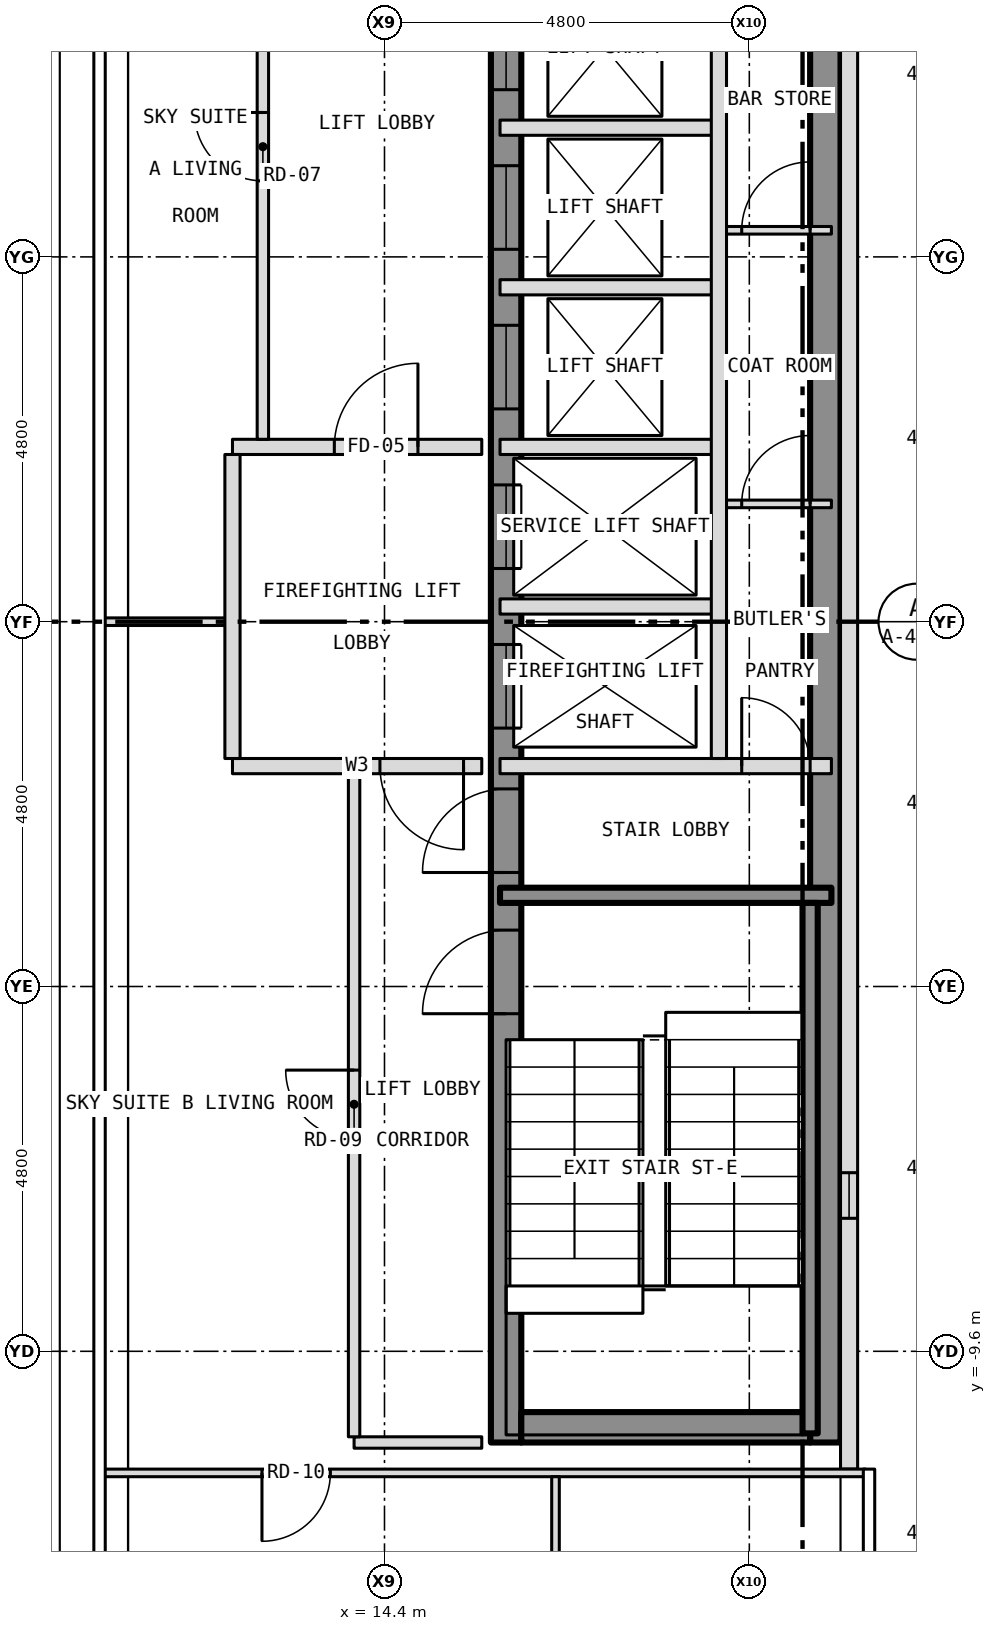
"""IFC4 building model, lengths in metres.
Left out: names, types, materials, properties, quantities, classifications, styles, units other than length and angle.
Written with IfcOpenShell. Run it as: python <this file> out.ifc"""

import sys

from ifc_helpers import new_model, si_unit, direction, frame, frame_2d, origin, place, context, subcontext, project, spatial, rectangle, extrude, element, fill, save


model = new_model("IFC4")
c1 = context("Model", 3, precision=1e-05, world=origin(), true_north=direction((0.0, 1.0)))
c2 = subcontext(c1, "Body", "Model", "MODEL_VIEW")
j1 = project(units=[si_unit("LENGTHUNIT", "METRE"), si_unit("PLANEANGLEUNIT", "RADIAN")], contexts=[c1])
p1 = place(None, origin())
s1 = spatial("IfcSite", under=j1, at=p1, CompositionType="ELEMENT")
p2 = place(p1, origin())
s2 = spatial("IfcBuilding", under=s1, at=p2, CompositionType="ELEMENT")
p3 = place(p2, frame((0.0, 0.0, 283.0)))
s3 = spatial("IfcBuildingStorey", under=s2, at=p3, CompositionType="ELEMENT", Elevation=283.0)
p4 = place(p3, frame((16.0, -10.8, 0.0), z_axis=(0.0, 0.0, 1.0), x_axis=(0.0, 1.0, 0.0)))
e1 = element("IfcWall", 1, at=p4, inside=s3, PredefinedType="SHEAR", context=c2, shape_type="SweptSolid", body=[
    extrude(rectangle(XDim=21.6, YDim=0.4, at=frame_2d((10.8, 0.0))), origin(), (0.0, 0.0, 1.0), 3.25),
])
p5 = place(p4, frame((9.4, 0.0, 0.0)))
e2 = element("IfcOpeningElement", 2, at=p5, cuts=e1, PredefinedType="OPENING", context=c2, shape_type="SweptSolid", body=[
    extrude(rectangle(XDim=1.1, YDim=2.1, at=frame_2d((0.55, 1.05))), frame((0.0, 0.212, 0.0), z_axis=(0.0, -1.0, 0.0), x_axis=(1.0, 0.0, 0.0)), (0.0, 0.0, 1.0), 0.424),
])
p6 = place(p4, frame((11.5, 0.0, 0.0)))
e3 = element("IfcOpeningElement", 3, at=p6, cuts=e1, PredefinedType="OPENING", context=c2, shape_type="SweptSolid", body=[
    extrude(rectangle(XDim=1.1, YDim=2.1, at=frame_2d((0.55, 1.05))), frame((0.0, 0.212, 0.0), z_axis=(0.0, -1.0, 0.0), x_axis=(1.0, 0.0, 0.0)), (0.0, 0.0, 1.0), 0.424),
])
p7 = place(p4, frame((13.6, 0.0, 0.0)))
e4 = element("IfcOpeningElement", 4, at=p7, cuts=e1, PredefinedType="OPENING", context=c2, shape_type="SweptSolid", body=[
    extrude(rectangle(XDim=1.1, YDim=2.1, at=frame_2d((0.55, 1.05))), frame((0.0, 0.212, 0.0), z_axis=(0.0, -1.0, 0.0), x_axis=(1.0, 0.0, 0.0)), (0.0, 0.0, 1.0), 0.424),
])
p8 = place(p4, frame((15.7, 0.0, 0.0)))
e5 = element("IfcOpeningElement", 5, at=p8, cuts=e1, PredefinedType="OPENING", context=c2, shape_type="SweptSolid", body=[
    extrude(rectangle(XDim=1.1, YDim=2.1, at=frame_2d((0.55, 1.05))), frame((0.0, 0.212, 0.0), z_axis=(0.0, -1.0, 0.0), x_axis=(1.0, 0.0, 0.0)), (0.0, 0.0, 1.0), 0.424),
])
p9 = place(p4, frame((17.8, 0.0, 0.0)))
e6 = element("IfcOpeningElement", 6, at=p9, cuts=e1, PredefinedType="OPENING", context=c2, shape_type="SweptSolid", body=[
    extrude(rectangle(XDim=1.1, YDim=2.1, at=frame_2d((0.55, 1.05))), frame((0.0, 0.212, 0.0), z_axis=(0.0, -1.0, 0.0), x_axis=(1.0, 0.0, 0.0)), (0.0, 0.0, 1.0), 0.424),
])
p10 = place(p4, frame((5.642, 0.0, 0.0)))
e7 = element("IfcOpeningElement", 7, at=p10, cuts=e1, PredefinedType="OPENING", context=c2, shape_type="SweptSolid", body=[
    extrude(rectangle(XDim=1.1, YDim=2.1, at=frame_2d((0.55, 1.05))), frame((0.0, 0.212, 0.0), z_axis=(0.0, -1.0, 0.0), x_axis=(1.0, 0.0, 0.0)), (0.0, 0.0, 1.0), 0.424),
])
p11 = place(p4, frame((7.5, 0.0, 0.0)))
e8 = element("IfcOpeningElement", 8, at=p11, cuts=e1, PredefinedType="OPENING", context=c2, shape_type="SweptSolid", body=[
    extrude(rectangle(XDim=1.1, YDim=2.1, at=frame_2d((0.55, 1.05))), frame((0.0, 0.212, 0.0), z_axis=(0.0, -1.0, 0.0), x_axis=(1.0, 0.0, 0.0)), (0.0, 0.0, 1.0), 0.424),
])
p12 = place(p4, frame((20.0, 0.0, 0.0)))
e9 = element("IfcOpeningElement", 9, at=p12, cuts=e1, PredefinedType="OPENING", context=c2, shape_type="SweptSolid", body=[
    extrude(rectangle(XDim=0.9, YDim=2.1, at=frame_2d((0.45, 1.05))), frame((0.0, 0.212, 0.0), z_axis=(0.0, -1.0, 0.0), x_axis=(1.0, 0.0, 0.0)), (0.0, 0.0, 1.0), 0.424),
])
p13 = place(p3, frame((20.2, -10.8, 0.0), z_axis=(0.0, 0.0, 1.0), x_axis=(0.0, 1.0, 0.0)))
e10 = element("IfcWall", 10, at=p13, inside=s3, PredefinedType="SHEAR", context=c2, shape_type="SweptSolid", body=[
    extrude(rectangle(XDim=21.6, YDim=0.4, at=frame_2d((10.8, 0.0))), origin(), (0.0, 0.0, 1.0), 3.25),
])
p14 = place(p3, frame((16.2, -10.6, 0.0), z_axis=(0.0, 0.0, 1.0), x_axis=(1.0, 0.0, 0.0)))
e11 = element("IfcWall", 11, at=p14, inside=s3, PredefinedType="SHEAR", context=c2, shape_type="SweptSolid", body=[
    extrude(rectangle(XDim=3.8, YDim=0.4, at=frame_2d((1.9, 0.0))), origin(), (0.0, 0.0, 1.0), 3.25),
])
p15 = place(p3, frame((20.512, -11.15, 0.0), z_axis=(0.0, 0.0, 1.0), x_axis=(0.0, 1.0, 0.0)))
e12 = element("IfcWall", 12, at=p15, inside=s3, PredefinedType="SOLIDWALL", context=c2, shape_type="SweptSolid", body=[
    extrude(rectangle(XDim=22.3, YDim=0.225, at=frame_2d((11.15, 0.0))), origin(), (0.0, 0.0, 1.0), 3.5),
])
p16 = place(p15, frame((3.3, 0.0, 1.0)))
e13 = element("IfcOpeningElement", 13, at=p16, cuts=e12, PredefinedType="OPENING", context=c2, shape_type="SweptSolid", body=[
    extrude(rectangle(XDim=0.6, YDim=1.5, at=frame_2d((0.3, 0.75))), frame((0.0, 0.125, 0.0), z_axis=(0.0, -1.0, 0.0), x_axis=(1.0, 0.0, 0.0)), (0.0, 0.0, 1.0), 0.249),
])
p17 = place(p3, frame((10.696, -11.2, 0.0), z_axis=(0.0, 0.0, 1.0), x_axis=(1.0, 0.0, 0.0)))
e14 = element("IfcWall", 14, at=p17, inside=s3, PredefinedType="PARTITIONING", context=c2, shape_type="SweptSolid", body=[
    extrude(rectangle(XDim=10.034, YDim=0.1, at=frame_2d((5.017, 0.0))), origin(), (0.0, 0.0, 1.0), 3.35),
])
p18 = place(p17, frame((2.092, 0.0, 0.0)))
e15 = element("IfcOpeningElement", 15, at=p18, cuts=e14, PredefinedType="OPENING", context=c2, shape_type="SweptSolid", body=[
    extrude(rectangle(XDim=0.9, YDim=2.1, at=frame_2d((0.45, 1.05))), frame((0.0, 0.062, 0.0), z_axis=(0.0, -1.0, 0.0), x_axis=(1.0, 0.0, 0.0)), (0.0, 0.0, 1.0), 0.124),
])
p19 = place(p3, frame((14.0, -10.8, 0.0), z_axis=(0.0, 0.0, 1.0), x_axis=(1.0, 0.0, 0.0)))
e16 = element("IfcWall", 16, at=p19, inside=s3, PredefinedType="PARTITIONING", context=c2, shape_type="SweptSolid", body=[
    extrude(rectangle(XDim=1.68, YDim=0.15, at=frame_2d((0.84, 0.0))), origin(), (0.0, 0.0, 1.0), 3.35),
])
p20 = place(p3, frame((15.92, -3.6, 0.0), z_axis=(0.0, 0.0, 1.0), x_axis=(1.0, 0.0, 0.0)))
e17 = element("IfcWall", 17, at=p20, inside=s3, PredefinedType="SHEAR", context=c2, shape_type="SweptSolid", body=[
    extrude(rectangle(XDim=4.36, YDim=0.2, at=frame_2d((2.18, 0.0))), origin(), (0.0, 0.0, 1.0), 3.25),
])
p21 = place(p3, frame((12.4, -1.9, 0.0), z_axis=(0.0, 0.0, 1.0), x_axis=(1.0, 0.0, 0.0)))
e18 = element("IfcWall", 18, at=p21, inside=s3, PredefinedType="PARTITIONING", context=c2, shape_type="SweptSolid", body=[
    extrude(rectangle(XDim=3.28, YDim=0.2, at=frame_2d((1.64, 0.0))), origin(), (0.0, 0.0, 1.0), 3.35),
])
p22 = place(p21, frame((1.94, 0.0, 0.0)))
e19 = element("IfcOpeningElement", 19, at=p22, cuts=e18, PredefinedType="OPENING", context=c2, shape_type="SweptSolid", body=[
    extrude(rectangle(XDim=1.1, YDim=2.1, at=frame_2d((0.55, 1.05))), frame((0.0, 0.112, 0.0), z_axis=(0.0, -1.0, 0.0), x_axis=(1.0, 0.0, 0.0)), (0.0, 0.0, 1.0), 0.224),
])
p23 = place(p3, frame((15.92, -1.9, 0.0), z_axis=(0.0, 0.0, 1.0), x_axis=(1.0, 0.0, 0.0)))
e20 = element("IfcWall", 20, at=p23, inside=s3, PredefinedType="PARTITIONING", context=c2, shape_type="SweptSolid", body=[
    extrude(rectangle(XDim=4.36, YDim=0.2, at=frame_2d((2.18, 0.0))), origin(), (0.0, 0.0, 1.0), 3.25),
])
p24 = place(p23, frame((3.18, 0.0, 0.0)))
e21 = element("IfcOpeningElement", 21, at=p24, cuts=e20, PredefinedType="OPENING", context=c2, shape_type="SweptSolid", body=[
    extrude(rectangle(XDim=0.9, YDim=2.1, at=frame_2d((0.45, 1.05))), frame((0.0, 0.112, 0.0), z_axis=(0.0, -1.0, 0.0), x_axis=(1.0, 0.0, 0.0)), (0.0, 0.0, 1.0), 0.224),
])
p25 = place(p3, frame((10.696, 0.0, 0.0), z_axis=(0.0, 0.0, 1.0), x_axis=(1.0, 0.0, 0.0)))
e22 = element("IfcWall", 22, at=p25, inside=s3, PredefinedType="PARTITIONING", context=c2, shape_type="SweptSolid", body=[
    extrude(rectangle(XDim=1.704, YDim=0.1, at=frame_2d((0.852, 0.0))), origin(), (0.0, 0.0, 1.0), 2.728),
])
p26 = place(p3, frame((15.92, 0.2, 0.0), z_axis=(0.0, 0.0, 1.0), x_axis=(1.0, 0.0, 0.0)))
e23 = element("IfcWall", 23, at=p26, inside=s3, PredefinedType="PARTITIONING", context=c2, shape_type="SweptSolid", body=[
    extrude(rectangle(XDim=2.88, YDim=0.2, at=frame_2d((1.44, 0.0))), origin(), (0.0, 0.0, 1.0), 3.25),
])
p27 = place(p3, frame((18.8, 1.55, 0.0), z_axis=(0.0, 0.0, 1.0), x_axis=(1.0, 0.0, 0.0)))
e24 = element("IfcWall", 24, at=p27, inside=s3, PredefinedType="PARTITIONING", context=c2, shape_type="SweptSolid", body=[
    extrude(rectangle(XDim=1.48, YDim=0.1, at=frame_2d((0.74, 0.0))), origin(), (0.0, 0.0, 1.0), 3.25),
])
p28 = place(p27, frame((0.3, 0.0, 0.0)))
e25 = element("IfcOpeningElement", 25, at=p28, cuts=e24, PredefinedType="OPENING", context=c2, shape_type="SweptSolid", body=[
    extrude(rectangle(XDim=0.9, YDim=2.1, at=frame_2d((0.45, 1.05))), frame((0.0, 0.062, 0.0), z_axis=(0.0, -1.0, 0.0), x_axis=(1.0, 0.0, 0.0)), (0.0, 0.0, 1.0), 0.124),
])
p29 = place(p3, frame((12.4, 2.3, 0.0), z_axis=(0.0, 0.0, 1.0), x_axis=(1.0, 0.0, 0.0)))
e26 = element("IfcWall", 26, at=p29, inside=s3, PredefinedType="PARTITIONING", context=c2, shape_type="SweptSolid", body=[
    extrude(rectangle(XDim=3.28, YDim=0.2, at=frame_2d((1.64, 0.0))), origin(), (0.0, 0.0, 1.0), 3.35),
])
p30 = place(p29, frame((1.34, 0.0, 0.0)))
e27 = element("IfcOpeningElement", 27, at=p30, cuts=e26, PredefinedType="OPENING", context=c2, shape_type="SweptSolid", body=[
    extrude(rectangle(XDim=1.1, YDim=2.1, at=frame_2d((0.55, 1.05))), frame((0.0, 0.112, 0.0), z_axis=(0.0, -1.0, 0.0), x_axis=(1.0, 0.0, 0.0)), (0.0, 0.0, 1.0), 0.224),
])
for number, where, z_axis, x_axis in (
    (28, (15.92, 2.3, 0.0), (0.0, 0.0, 1.0), (1.0, 0.0, 0.0)),
    (29, (15.92, 4.4, 0.0), (0.0, 0.0, 1.0), (1.0, 0.0, 0.0)),
):
    element("IfcWall", number, at=place(p3, frame(where, z_axis=z_axis, x_axis=x_axis)), inside=s3, PredefinedType="PARTITIONING", context=c2, shape_type="SweptSolid", body=[
        extrude(rectangle(XDim=2.88, YDim=0.2, at=frame_2d((1.44, 0.0))), origin(), (0.0, 0.0, 1.0), 3.25),
    ])
p31 = place(p3, frame((18.8, 5.15, 0.0), z_axis=(0.0, 0.0, 1.0), x_axis=(1.0, 0.0, 0.0)))
e30 = element("IfcWall", 30, at=p31, inside=s3, PredefinedType="PARTITIONING", context=c2, shape_type="SweptSolid", body=[
    extrude(rectangle(XDim=1.48, YDim=0.1, at=frame_2d((0.74, 0.0))), origin(), (0.0, 0.0, 1.0), 3.25),
])
p32 = place(p31, frame((0.3, 0.0, 0.0)))
e31 = element("IfcOpeningElement", 31, at=p32, cuts=e30, PredefinedType="OPENING", context=c2, shape_type="SweptSolid", body=[
    extrude(rectangle(XDim=0.9, YDim=2.1, at=frame_2d((0.45, 1.05))), frame((0.0, 0.062, 0.0), z_axis=(0.0, -1.0, 0.0), x_axis=(1.0, 0.0, 0.0)), (0.0, 0.0, 1.0), 0.124),
])
p33 = place(p3, frame((15.92, 6.5, 0.0), z_axis=(0.0, 0.0, 1.0), x_axis=(1.0, 0.0, 0.0)))
e32 = element("IfcWall", 32, at=p33, inside=s3, PredefinedType="PARTITIONING", context=c2, shape_type="SweptSolid", body=[
    extrude(rectangle(XDim=2.88, YDim=0.2, at=frame_2d((1.44, 0.0))), origin(), (0.0, 0.0, 1.0), 3.25),
])
p34 = place(p3, frame((12.4, -1.8, 0.0), z_axis=(0.0, 0.0, 1.0), x_axis=(0.0, 1.0, 0.0)))
e33 = element("IfcWall", 33, at=p34, inside=s3, PredefinedType="PARTITIONING", context=c2, shape_type="SweptSolid", body=[
    extrude(rectangle(XDim=4.0, YDim=0.2, at=frame_2d((2.0, 0.0))), origin(), (0.0, 0.0, 1.0), 3.35),
])
p35 = place(p3, frame((12.8, 2.4, 0.0), z_axis=(0.0, 0.0, 1.0), x_axis=(0.0, 1.0, 0.0)))
e34 = element("IfcWall", 34, at=p35, inside=s3, PredefinedType="PARTITIONING", context=c2, shape_type="SweptSolid", body=[
    extrude(rectangle(XDim=8.325, YDim=0.15, at=frame_2d((4.163, 0.0))), origin(), (0.0, 0.0, 1.0), 3.35),
])
p36 = place(p35, frame((3.4, 0.0, 0.0)))
e35 = element("IfcOpeningElement", 35, at=p36, cuts=e34, PredefinedType="OPENING", context=c2, shape_type="SweptSolid", body=[
    extrude(rectangle(XDim=0.9, YDim=2.1, at=frame_2d((0.45, 1.05))), frame((0.0, 0.087, 0.0), z_axis=(0.0, -1.0, 0.0), x_axis=(1.0, 0.0, 0.0)), (0.0, 0.0, 1.0), 0.174),
])
p37 = place(p3, frame((14.0, -10.725, 0.0), z_axis=(0.0, 0.0, 1.0), x_axis=(0.0, 1.0, 0.0)))
e36 = element("IfcWall", 36, at=p37, inside=s3, PredefinedType="PARTITIONING", context=c2, shape_type="SweptSolid", body=[
    extrude(rectangle(XDim=8.725, YDim=0.15, at=frame_2d((4.363, 0.0))), origin(), (0.0, 0.0, 1.0), 3.35),
])
p38 = place(p37, frame((3.925, 0.0, 0.0)))
e37 = element("IfcOpeningElement", 37, at=p38, cuts=e36, PredefinedType="OPENING", context=c2, shape_type="SweptSolid", body=[
    extrude(rectangle(XDim=0.9, YDim=2.1, at=frame_2d((0.45, 1.05))), frame((0.0, 0.087, 0.0), z_axis=(0.0, -1.0, 0.0), x_axis=(1.0, 0.0, 0.0)), (0.0, 0.0, 1.0), 0.174),
])
p39 = place(p3, frame((16.65, -14.73, 0.0), z_axis=(0.0, 0.0, 1.0), x_axis=(0.0, 1.0, 0.0)))
e38 = element("IfcWall", 38, at=p39, inside=s3, PredefinedType="PARTITIONING", context=c2, shape_type="SweptSolid", body=[
    extrude(rectangle(XDim=3.48, YDim=0.1, at=frame_2d((1.74, 0.0))), origin(), (0.0, 0.0, 1.0), 3.35),
])
p40 = place(p39, frame((1.47, 0.0, 0.0)))
e39 = element("IfcOpeningElement", 39, at=p40, cuts=e38, PredefinedType="OPENING", context=c2, shape_type="SweptSolid", body=[
    extrude(rectangle(XDim=0.9, YDim=2.1, at=frame_2d((0.45, 1.05))), frame((0.0, 0.062, 0.0), z_axis=(0.0, -1.0, 0.0), x_axis=(1.0, 0.0, 0.0)), (0.0, 0.0, 1.0), 0.124),
])
p41 = place(p3, frame((18.8, -1.8, 0.0), z_axis=(0.0, 0.0, 1.0), x_axis=(0.0, 1.0, 0.0)))
e40 = element("IfcWall", 40, at=p41, inside=s3, PredefinedType="PARTITIONING", context=c2, shape_type="SweptSolid", body=[
    extrude(rectangle(XDim=10.3, YDim=0.2, at=frame_2d((5.15, 0.0))), origin(), (0.0, 0.0, 1.0), 3.25),
])
p42 = place(p3, frame((20.0, -10.68, 0.0), z_axis=(0.0, 0.0, 1.0), x_axis=(0.0, 1.0, 0.0)))
e41 = element("IfcWall", 41, at=p42, inside=s3, PredefinedType="SHEAR", context=c2, shape_type="SweptSolid", body=[
    extrude(rectangle(XDim=6.98, YDim=0.2, at=frame_2d((3.49, 0.0))), origin(), (0.0, 0.0, 1.0), 3.25),
])
p43 = place(p16, origin())
e42 = element("IfcWindow", 42, at=p43, inside=s3, PartitioningType="SINGLE_PANEL", PredefinedType="WINDOW", context=c2, shape_type="SweptSolid", body=[
    extrude(rectangle(XDim=0.6, YDim=1.5, at=frame_2d((0.3, 0.75))), frame((0.0, -0.022, 0.0), z_axis=(0.0, -1.0, 0.0), x_axis=(1.0, 0.0, 0.0)), (0.0, 0.0, 1.0), 0.06),
])
fill(e13, e42)
p44 = place(p5, origin())
e43 = element("IfcDoor", 43, at=p44, inside=s3, OperationType="SLIDING_TO_LEFT", PredefinedType="DOOR", context=c2, shape_type="SweptSolid", body=[
    extrude(rectangle(XDim=1.1, YDim=2.1, at=frame_2d((0.55, 1.05))), frame((0.0, 0.025, 0.0), z_axis=(0.0, -1.0, 0.0), x_axis=(1.0, 0.0, 0.0)), (0.0, 0.0, 1.0), 0.05),
])
fill(e2, e43)
p45 = place(p6, origin())
e44 = element("IfcDoor", 44, at=p45, inside=s3, OperationType="SLIDING_TO_LEFT", PredefinedType="DOOR", context=c2, shape_type="SweptSolid", body=[
    extrude(rectangle(XDim=1.1, YDim=2.1, at=frame_2d((0.55, 1.05))), frame((0.0, 0.025, 0.0), z_axis=(0.0, -1.0, 0.0), x_axis=(1.0, 0.0, 0.0)), (0.0, 0.0, 1.0), 0.05),
])
fill(e3, e44)
p46 = place(p7, origin())
e45 = element("IfcDoor", 45, at=p46, inside=s3, OperationType="SLIDING_TO_LEFT", PredefinedType="DOOR", context=c2, shape_type="SweptSolid", body=[
    extrude(rectangle(XDim=1.1, YDim=2.1, at=frame_2d((0.55, 1.05))), frame((0.0, 0.025, 0.0), z_axis=(0.0, -1.0, 0.0), x_axis=(1.0, 0.0, 0.0)), (0.0, 0.0, 1.0), 0.05),
])
fill(e4, e45)
p47 = place(p8, origin())
e46 = element("IfcDoor", 46, at=p47, inside=s3, OperationType="SLIDING_TO_LEFT", PredefinedType="DOOR", context=c2, shape_type="SweptSolid", body=[
    extrude(rectangle(XDim=1.1, YDim=2.1, at=frame_2d((0.55, 1.05))), frame((0.0, 0.025, 0.0), z_axis=(0.0, -1.0, 0.0), x_axis=(1.0, 0.0, 0.0)), (0.0, 0.0, 1.0), 0.05),
])
fill(e5, e46)
p48 = place(p9, origin())
e47 = element("IfcDoor", 47, at=p48, inside=s3, OperationType="SLIDING_TO_LEFT", PredefinedType="DOOR", context=c2, shape_type="SweptSolid", body=[
    extrude(rectangle(XDim=1.1, YDim=2.1, at=frame_2d((0.55, 1.05))), frame((0.0, 0.025, 0.0), z_axis=(0.0, -1.0, 0.0), x_axis=(1.0, 0.0, 0.0)), (0.0, 0.0, 1.0), 0.05),
])
fill(e6, e47)
p49 = place(p10, origin())
e48 = element("IfcDoor", 48, at=p49, inside=s3, OperationType="SINGLE_SWING_LEFT", PredefinedType="DOOR", context=c2, shape_type="SweptSolid", body=[
    extrude(rectangle(XDim=1.1, YDim=2.1, at=frame_2d((0.55, 1.05))), frame((0.0, 0.025, 0.0), z_axis=(0.0, -1.0, 0.0), x_axis=(1.0, 0.0, 0.0)), (0.0, 0.0, 1.0), 0.05),
])
fill(e7, e48)
p50 = place(p11, origin())
e49 = element("IfcDoor", 49, at=p50, inside=s3, OperationType="SINGLE_SWING_LEFT", PredefinedType="DOOR", context=c2, shape_type="SweptSolid", body=[
    extrude(rectangle(XDim=1.1, YDim=2.1, at=frame_2d((0.55, 1.05))), frame((0.0, 0.025, 0.0), z_axis=(0.0, -1.0, 0.0), x_axis=(1.0, 0.0, 0.0)), (0.0, 0.0, 1.0), 0.05),
])
fill(e8, e49)
p51 = place(p24, origin())
e50 = element("IfcDoor", 50, at=p51, inside=s3, OperationType="SINGLE_SWING_LEFT", PredefinedType="DOOR", context=c2, shape_type="SweptSolid", body=[
    extrude(rectangle(XDim=0.9, YDim=2.1, at=frame_2d((0.45, 1.05))), frame((0.0, 0.025, 0.0), z_axis=(0.0, -1.0, 0.0), x_axis=(1.0, 0.0, 0.0)), (0.0, 0.0, 1.0), 0.05),
])
fill(e21, e50)
p52 = place(p28, origin())
e51 = element("IfcDoor", 51, at=p52, inside=s3, OperationType="SINGLE_SWING_RIGHT", PredefinedType="DOOR", context=c2, shape_type="SweptSolid", body=[
    extrude(rectangle(XDim=0.9, YDim=2.1, at=frame_2d((0.45, 1.05))), frame((0.0, 0.025, 0.0), z_axis=(0.0, -1.0, 0.0), x_axis=(1.0, 0.0, 0.0)), (0.0, 0.0, 1.0), 0.05),
])
fill(e25, e51)
p53 = place(p32, origin())
e52 = element("IfcDoor", 52, at=p53, inside=s3, OperationType="SINGLE_SWING_RIGHT", PredefinedType="DOOR", context=c2, shape_type="SweptSolid", body=[
    extrude(rectangle(XDim=0.9, YDim=2.1, at=frame_2d((0.45, 1.05))), frame((0.0, 0.025, 0.0), z_axis=(0.0, -1.0, 0.0), x_axis=(1.0, 0.0, 0.0)), (0.0, 0.0, 1.0), 0.05),
])
fill(e31, e52)
p54 = place(p30, origin())
e53 = element("IfcDoor", 53, at=p54, inside=s3, OperationType="SINGLE_SWING_RIGHT", PredefinedType="DOOR", context=c2, shape_type="SweptSolid", body=[
    extrude(rectangle(XDim=1.1, YDim=2.1, at=frame_2d((0.55, 1.05))), frame((0.0, 0.025, 0.0), z_axis=(0.0, -1.0, 0.0), x_axis=(1.0, 0.0, 0.0)), (0.0, 0.0, 1.0), 0.05),
])
fill(e27, e53)
p55 = place(p22, origin())
e54 = element("IfcDoor", 54, at=p55, inside=s3, OperationType="SINGLE_SWING_RIGHT", PredefinedType="DOOR", context=c2, shape_type="SweptSolid", body=[
    extrude(rectangle(XDim=1.1, YDim=2.1, at=frame_2d((0.55, 1.05))), frame((0.0, 0.025, 0.0), z_axis=(0.0, -1.0, 0.0), x_axis=(1.0, 0.0, 0.0)), (0.0, 0.0, 1.0), 0.05),
])
fill(e19, e54)
p56 = place(p36, origin())
e55 = element("IfcDoor", 55, at=p56, inside=s3, OperationType="SINGLE_SWING_RIGHT", PredefinedType="DOOR", context=c2, shape_type="SweptSolid", body=[
    extrude(rectangle(XDim=0.9, YDim=2.1, at=frame_2d((0.45, 1.05))), frame((0.0, 0.025, 0.0), z_axis=(0.0, -1.0, 0.0), x_axis=(1.0, 0.0, 0.0)), (0.0, 0.0, 1.0), 0.05),
])
fill(e35, e55)
p57 = place(p38, origin())
e56 = element("IfcDoor", 56, at=p57, inside=s3, OperationType="SINGLE_SWING_RIGHT", PredefinedType="DOOR", context=c2, shape_type="SweptSolid", body=[
    extrude(rectangle(XDim=0.9, YDim=2.1, at=frame_2d((0.45, 1.05))), frame((0.0, 0.025, 0.0), z_axis=(0.0, -1.0, 0.0), x_axis=(1.0, 0.0, 0.0)), (0.0, 0.0, 1.0), 0.05),
])
fill(e37, e56)
p58 = place(p18, origin())
e57 = element("IfcDoor", 57, at=p58, inside=s3, OperationType="SINGLE_SWING_LEFT", PredefinedType="DOOR", context=c2, shape_type="SweptSolid", body=[
    extrude(rectangle(XDim=0.9, YDim=2.1, at=frame_2d((0.45, 1.05))), frame((0.0, 0.025, 0.0), z_axis=(0.0, -1.0, 0.0), x_axis=(1.0, 0.0, 0.0)), (0.0, 0.0, 1.0), 0.05),
])
fill(e15, e57)
save(model, sys.argv[1])
